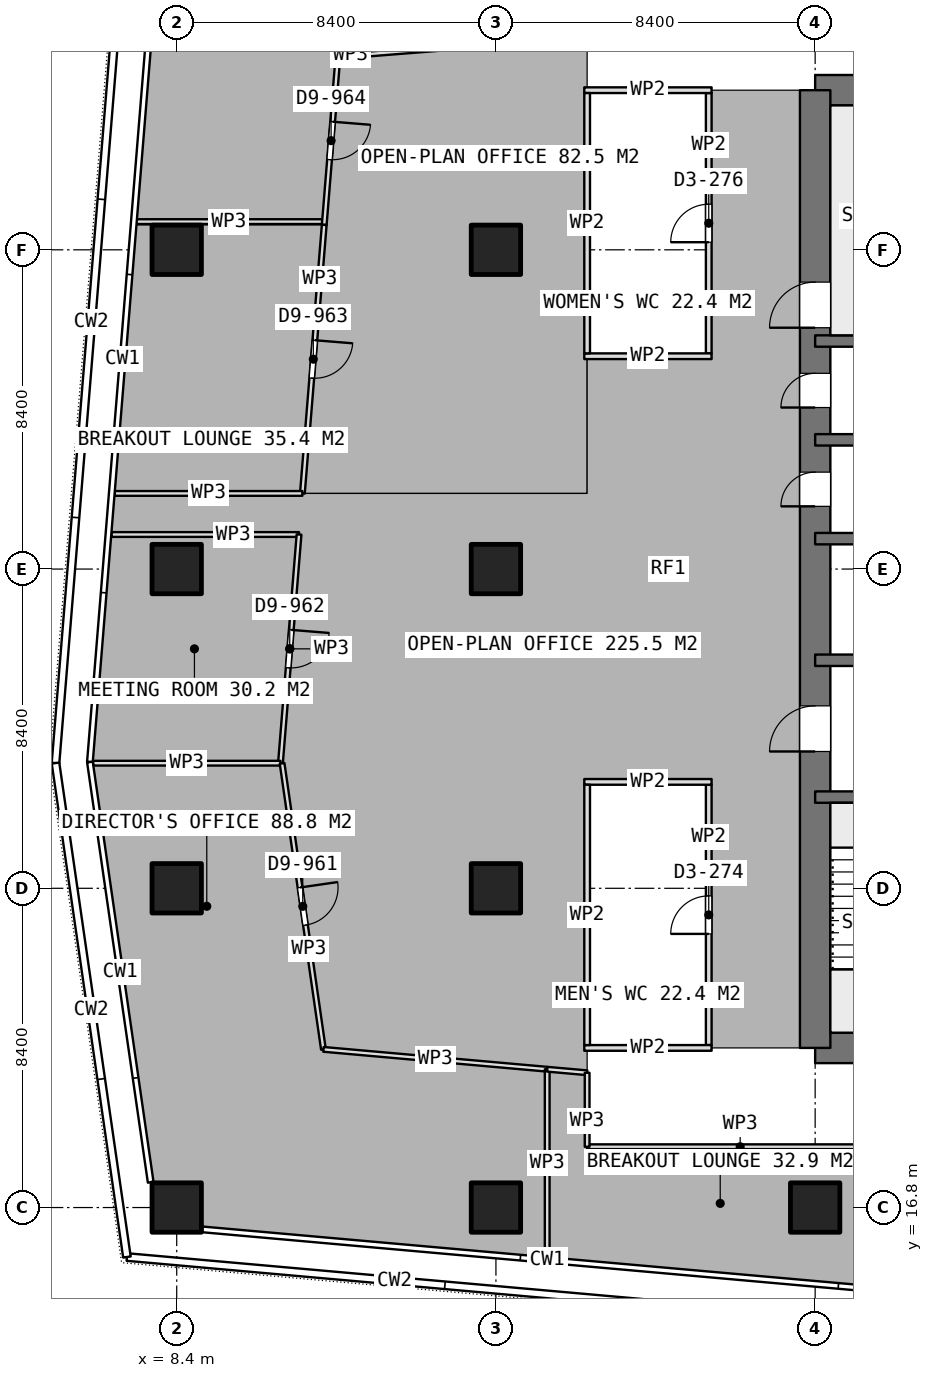
"""IFC4 building model, lengths in metres.
Left out: names, types, materials, properties, quantities, classifications, styles, units other than length and angle.
Written with IfcOpenShell. Run it as: python <this file> out.ifc"""

import sys

from ifc_helpers import new_model, si_unit, direction, frame, frame_2d, origin, origin_2d, place, context, subcontext, project, spatial, rectangle, extrude, element, fill, save


model = new_model("IFC4")
c1 = context("Model", 3, precision=1e-05, world=origin(), true_north=direction((0.0, 1.0)))
c2 = subcontext(c1, "Body", "Model", "MODEL_VIEW")
j1 = project(units=[si_unit("LENGTHUNIT", "METRE"), si_unit("PLANEANGLEUNIT", "RADIAN")], contexts=[c1])
p1 = place(None, origin())
s1 = spatial("IfcSite", under=j1, at=p1, CompositionType="ELEMENT")
p2 = place(p1, origin())
s2 = spatial("IfcBuilding", under=s1, at=p2, CompositionType="ELEMENT")
p3 = place(p2, frame((0.0, 0.0, 257.6)))
s3 = spatial("IfcBuildingStorey", under=s2, at=p3, CompositionType="ELEMENT", Elevation=257.6)
for number, where, z_axis, x_axis in (
    (1, (25.2, 21.0, 0.0), (0.0, 0.0, 1.0), (1.0, 0.0, 0.0)),
    (2, (25.2, 46.2, 0.0), (0.0, 0.0, 1.0), (1.0, 0.0, 0.0)),
):
    element("IfcWall", number, at=place(p3, frame(where, z_axis=z_axis, x_axis=x_axis)), inside=s3, PredefinedType="SHEAR", context=c2, shape_type="SweptSolid", body=[
        extrude(rectangle(XDim=10.4, YDim=0.8, at=frame_2d((5.2, 0.0))), origin(), (0.0, 0.0, 1.0), 3.75),
    ])
p4 = place(p3, frame((25.2, 21.0, 0.0), z_axis=(0.0, 0.0, 1.0), x_axis=(0.0, 1.0, 0.0)))
e3 = element("IfcWall", 3, at=p4, inside=s3, PredefinedType="SHEAR", context=c2, shape_type="SweptSolid", body=[
    extrude(rectangle(XDim=25.2, YDim=0.8, at=frame_2d((12.6, 0.0))), origin(), (0.0, 0.0, 1.0), 3.75),
])
p5 = place(p4, frame((7.8, 0.0, 0.0)))
e4 = element("IfcOpeningElement", 4, at=p5, cuts=e3, PredefinedType="OPENING", context=c2, shape_type="SweptSolid", body=[
    extrude(rectangle(XDim=1.2, YDim=2.1, at=frame_2d((0.6, 1.05))), frame((0.0, 0.41, 0.0), z_axis=(0.0, -1.0, 0.0), x_axis=(1.0, 0.0, 0.0)), (0.0, 0.0, 1.0), 0.82),
])
p6 = place(p4, frame((14.25, 0.0, 0.0)))
e5 = element("IfcOpeningElement", 5, at=p6, cuts=e3, PredefinedType="OPENING", context=c2, shape_type="SweptSolid", body=[
    extrude(rectangle(XDim=0.9, YDim=2.1, at=frame_2d((0.45, 1.05))), frame((0.0, 0.41, 0.0), z_axis=(0.0, -1.0, 0.0), x_axis=(1.0, 0.0, 0.0)), (0.0, 0.0, 1.0), 0.82),
])
p7 = place(p4, frame((16.85, 0.0, 0.0)))
e6 = element("IfcOpeningElement", 6, at=p7, cuts=e3, PredefinedType="OPENING", context=c2, shape_type="SweptSolid", body=[
    extrude(rectangle(XDim=0.9, YDim=2.1, at=frame_2d((0.45, 1.05))), frame((0.0, 0.41, 0.0), z_axis=(0.0, -1.0, 0.0), x_axis=(1.0, 0.0, 0.0)), (0.0, 0.0, 1.0), 0.82),
])
p8 = place(p4, frame((18.95, 0.0, 0.0)))
e7 = element("IfcOpeningElement", 7, at=p8, cuts=e3, PredefinedType="OPENING", context=c2, shape_type="SweptSolid", body=[
    extrude(rectangle(XDim=1.2, YDim=2.1, at=frame_2d((0.6, 1.05))), frame((0.0, 0.41, 0.0), z_axis=(0.0, -1.0, 0.0), x_axis=(1.0, 0.0, 0.0)), (0.0, 0.0, 1.0), 0.82),
])
p9 = place(p3, frame((25.2, 27.6, 0.0), z_axis=(0.0, 0.0, 1.0), x_axis=(1.0, 0.0, 0.0)))
e8 = element("IfcWall", 8, at=p9, inside=s3, PredefinedType="SHEAR", context=c2, shape_type="SweptSolid", body=[
    extrude(rectangle(XDim=6.6, YDim=0.3, at=frame_2d((3.3, 0.0))), origin(), (0.0, 0.0, 1.0), 3.75),
])
p10 = place(p9, frame((5.05, 0.0, 0.0)))
e9 = element("IfcOpeningElement", 9, at=p10, cuts=e8, PredefinedType="OPENING", context=c2, shape_type="SweptSolid", body=[
    extrude(rectangle(XDim=1.2, YDim=2.1, at=frame_2d((0.6, 1.05))), frame((0.0, 0.16, 0.0), z_axis=(0.0, -1.0, 0.0), x_axis=(1.0, 0.0, 0.0)), (0.0, 0.0, 1.0), 0.32),
])
p11 = place(p3, frame((25.2, 31.2, 0.0), z_axis=(0.0, 0.0, 1.0), x_axis=(1.0, 0.0, 0.0)))
e10 = element("IfcWall", 10, at=p11, inside=s3, PredefinedType="SHEAR", context=c2, shape_type="SweptSolid", body=[
    extrude(rectangle(XDim=6.6, YDim=0.3, at=frame_2d((3.3, 0.0))), origin(), (0.0, 0.0, 1.0), 3.75),
])
p12 = place(p11, frame((2.65, 0.0, 0.0)))
e11 = element("IfcOpeningElement", 11, at=p12, cuts=e10, PredefinedType="OPENING", context=c2, shape_type="SweptSolid", body=[
    extrude(rectangle(XDim=1.3, YDim=2.1, at=frame_2d((0.65, 1.05))), frame((0.0, 0.16, 0.0), z_axis=(0.0, -1.0, 0.0), x_axis=(1.0, 0.0, 0.0)), (0.0, 0.0, 1.0), 0.32),
])
for number, where, z_axis, x_axis in (
    (12, (25.2, 34.4, 0.0), (0.0, 0.0, 1.0), (1.0, 0.0, 0.0)),
    (13, (25.2, 37.0, 0.0), (0.0, 0.0, 1.0), (1.0, 0.0, 0.0)),
    (14, (25.2, 39.6, 0.0), (0.0, 0.0, 1.0), (1.0, 0.0, 0.0)),
):
    element("IfcWall", number, at=place(p3, frame(where, z_axis=z_axis, x_axis=x_axis)), inside=s3, PredefinedType="SHEAR", context=c2, shape_type="SweptSolid", body=[
        extrude(rectangle(XDim=6.6, YDim=0.3, at=frame_2d((3.3, 0.0))), origin(), (0.0, 0.0, 1.0), 3.75),
    ])
for number, where, z_axis, x_axis in (
    (15, (8.4, 16.8, 0.0), (0.0, 0.0, 1.0), (1.0, 0.0, 0.0)),
    (16, (8.4, 25.2, 0.0), (0.0, 0.0, 1.0), (1.0, 0.0, 0.0)),
    (17, (8.4, 33.6, 0.0), (0.0, 0.0, 1.0), (1.0, 0.0, 0.0)),
    (18, (8.4, 42.0, 0.0), (0.0, 0.0, 1.0), (1.0, 0.0, 0.0)),
    (19, (16.8, 16.8, 0.0), (0.0, 0.0, 1.0), (1.0, 0.0, 0.0)),
    (20, (16.8, 25.2, 0.0), (0.0, 0.0, 1.0), (1.0, 0.0, 0.0)),
    (21, (16.8, 33.6, 0.0), (0.0, 0.0, 1.0), (1.0, 0.0, 0.0)),
    (22, (16.8, 42.0, 0.0), (0.0, 0.0, 1.0), (1.0, 0.0, 0.0)),
    (23, (25.2, 16.8, 0.0), (0.0, 0.0, 1.0), (1.0, 0.0, 0.0)),
):
    element("IfcColumn", number, at=place(p3, frame(where, z_axis=z_axis, x_axis=x_axis)), inside=s3, PredefinedType="COLUMN", context=c2, shape_type="SweptSolid", body=[
        extrude(rectangle(XDim=1.3, YDim=1.3, at=origin_2d()), origin(), (0.0, 0.0, 1.0), 3.75),
    ])
for number, where, z_axis, x_axis in (
    (24, (19.125, 39.2, 0.0), (0.0, 0.0, 1.0), (1.0, 0.0, 0.0)),
    (25, (19.125, 46.2, 0.0), (0.0, 0.0, 1.0), (1.0, 0.0, 0.0)),
):
    element("IfcWall", number, at=place(p3, frame(where, z_axis=z_axis, x_axis=x_axis)), inside=s3, PredefinedType="PARTITIONING", context=c2, shape_type="SweptSolid", body=[
        extrude(rectangle(XDim=3.35, YDim=0.15, at=frame_2d((1.675, 0.0))), origin(), (0.0, 0.0, 1.0), 3.5),
    ])
p13 = place(p3, frame((19.2, 39.275, 0.0), z_axis=(0.0, 0.0, 1.0), x_axis=(0.0, 1.0, 0.0)))
e26 = element("IfcWall", 26, at=p13, inside=s3, PredefinedType="PARTITIONING", context=c2, shape_type="SweptSolid", body=[
    extrude(rectangle(XDim=6.85, YDim=0.15, at=frame_2d((3.425, 0.0))), origin(), (0.0, 0.0, 1.0), 3.5),
])
p14 = place(p3, frame((22.4, 39.275, 0.0), z_axis=(0.0, 0.0, 1.0), x_axis=(0.0, 1.0, 0.0)))
e27 = element("IfcWall", 27, at=p14, inside=s3, PredefinedType="PARTITIONING", context=c2, shape_type="SweptSolid", body=[
    extrude(rectangle(XDim=6.85, YDim=0.15, at=frame_2d((3.425, 0.0))), origin(), (0.0, 0.0, 1.0), 3.5),
])
p15 = place(p14, frame((2.925, 0.0, 0.0)))
e28 = element("IfcOpeningElement", 28, at=p15, cuts=e27, PredefinedType="OPENING", context=c2, shape_type="SweptSolid", body=[
    extrude(rectangle(XDim=1.0, YDim=2.1, at=frame_2d((0.5, 1.05))), frame((0.0, 0.085, 0.0), z_axis=(0.0, -1.0, 0.0), x_axis=(1.0, 0.0, 0.0)), (0.0, 0.0, 1.0), 0.17),
])
for number, where, z_axis, x_axis in (
    (29, (19.125, 21.0, 0.0), (0.0, 0.0, 1.0), (1.0, 0.0, 0.0)),
    (30, (19.125, 28.0, 0.0), (0.0, 0.0, 1.0), (1.0, 0.0, 0.0)),
):
    element("IfcWall", number, at=place(p3, frame(where, z_axis=z_axis, x_axis=x_axis)), inside=s3, PredefinedType="PARTITIONING", context=c2, shape_type="SweptSolid", body=[
        extrude(rectangle(XDim=3.35, YDim=0.15, at=frame_2d((1.675, 0.0))), origin(), (0.0, 0.0, 1.0), 3.5),
    ])
p16 = place(p3, frame((19.2, 21.075, 0.0), z_axis=(0.0, 0.0, 1.0), x_axis=(0.0, 1.0, 0.0)))
e31 = element("IfcWall", 31, at=p16, inside=s3, PredefinedType="PARTITIONING", context=c2, shape_type="SweptSolid", body=[
    extrude(rectangle(XDim=6.85, YDim=0.15, at=frame_2d((3.425, 0.0))), origin(), (0.0, 0.0, 1.0), 3.5),
])
p17 = place(p3, frame((22.4, 21.075, 0.0), z_axis=(0.0, 0.0, 1.0), x_axis=(0.0, 1.0, 0.0)))
e32 = element("IfcWall", 32, at=p17, inside=s3, PredefinedType="PARTITIONING", context=c2, shape_type="SweptSolid", body=[
    extrude(rectangle(XDim=6.85, YDim=0.15, at=frame_2d((3.425, 0.0))), origin(), (0.0, 0.0, 1.0), 3.5),
])
p18 = place(p17, frame((2.925, 0.0, 0.0)))
e33 = element("IfcOpeningElement", 33, at=p18, cuts=e32, PredefinedType="OPENING", context=c2, shape_type="SweptSolid", body=[
    extrude(rectangle(XDim=1.0, YDim=2.1, at=frame_2d((0.5, 1.05))), frame((0.0, 0.085, 0.0), z_axis=(0.0, -1.0, 0.0), x_axis=(1.0, 0.0, 0.0)), (0.0, 0.0, 1.0), 0.17),
])
p19 = place(p3, frame((12.226, 42.742, 0.0), z_axis=(0.0, 0.0, 1.0), x_axis=(-1.0, 0.0, 0.0)))
e34 = element("IfcWall", 34, at=p19, inside=s3, PredefinedType="PARTITIONING", context=c2, shape_type="SweptSolid", body=[
    extrude(rectangle(XDim=4.903, YDim=0.125, at=frame_2d((2.452, 0.0))), origin(), (0.0, 0.0, 1.0), 3.5),
])
p20 = place(p3, frame((15.95, 47.351, 0.0), z_axis=(0.0, 0.0, 1.0), x_axis=(-0.99682463174, -0.07962822086, 0.0)))
e35 = element("IfcWall", 35, at=p20, inside=s3, PredefinedType="PARTITIONING", context=c2, shape_type="SweptSolid", body=[
    extrude(rectangle(XDim=3.317, YDim=0.125, at=frame_2d((1.659, 0.0))), origin(), (0.0, 0.0, 1.0), 3.5),
])
p21 = place(p3, frame((12.643, 47.087, 0.0), z_axis=(0.0, 0.0, 1.0), x_axis=(-0.081240627764, -0.996694517092, 0.0)))
e36 = element("IfcWall", 36, at=p21, inside=s3, PredefinedType="PARTITIONING", context=c2, shape_type="SweptSolid", body=[
    extrude(rectangle(XDim=4.445, YDim=0.125, at=frame_2d((2.222, 0.0))), origin(), (0.0, 0.0, 1.0), 3.5),
])
p22 = place(p21, frame((1.722, 0.0, 0.0)))
e37 = element("IfcOpeningElement", 37, at=p22, cuts=e36, PredefinedType="OPENING", context=c2, shape_type="SweptSolid", body=[
    extrude(rectangle(XDim=1.0, YDim=2.1, at=frame_2d((0.5, 1.05))), frame((0.0, 0.073, 0.0), z_axis=(0.0, -1.0, 0.0), x_axis=(1.0, 0.0, 0.0)), (0.0, 0.0, 1.0), 0.145),
])
p23 = place(p3, frame((12.282, 42.656, 0.0), z_axis=(0.0, 0.0, 1.0), x_axis=(-0.08110159124, -0.996705840205, 0.0)))
e38 = element("IfcWall", 38, at=p23, inside=s3, PredefinedType="PARTITIONING", context=c2, shape_type="SweptSolid", body=[
    extrude(rectangle(XDim=7.089, YDim=0.125, at=frame_2d((3.545, 0.0))), origin(), (0.0, 0.0, 1.0), 3.5),
])
p24 = place(p23, frame((3.045, 0.0, 0.0)))
e39 = element("IfcOpeningElement", 39, at=p24, cuts=e38, PredefinedType="OPENING", context=c2, shape_type="SweptSolid", body=[
    extrude(rectangle(XDim=1.0, YDim=2.1, at=frame_2d((0.5, 1.05))), frame((0.0, 0.073, 0.0), z_axis=(0.0, -1.0, 0.0), x_axis=(1.0, 0.0, 0.0)), (0.0, 0.0, 1.0), 0.145),
])
p25 = place(p3, frame((11.707, 35.59, 0.0), z_axis=(0.0, 0.0, 1.0), x_axis=(-1.0, 0.0, 0.0)))
e40 = element("IfcWall", 40, at=p25, inside=s3, PredefinedType="PARTITIONING", context=c2, shape_type="SweptSolid", body=[
    extrude(rectangle(XDim=4.936, YDim=0.125, at=frame_2d((2.468, 0.0))), origin(), (0.0, 0.0, 1.0), 3.5),
])
p26 = place(p3, frame((6.683, 34.509, 0.0), z_axis=(0.0, 0.0, 1.0), x_axis=(1.0, 0.0, 0.0)))
e41 = element("IfcWall", 41, at=p26, inside=s3, PredefinedType="PARTITIONING", context=c2, shape_type="SweptSolid", body=[
    extrude(rectangle(XDim=4.936, YDim=0.125, at=frame_2d((2.468, 0.0))), origin(), (0.0, 0.0, 1.0), 3.5),
])
p27 = place(p3, frame((11.619, 34.509, 0.0), z_axis=(0.0, 0.0, 1.0), x_axis=(-0.081003722278, -0.99671379893, 0.0)))
e42 = element("IfcWall", 42, at=p27, inside=s3, PredefinedType="PARTITIONING", context=c2, shape_type="SweptSolid", body=[
    extrude(rectangle(XDim=6.037, YDim=0.125, at=frame_2d((3.019, 0.0))), origin(), (0.0, 0.0, 1.0), 3.5),
])
p28 = place(p27, frame((2.518, 0.0, 0.0)))
e43 = element("IfcOpeningElement", 43, at=p28, cuts=e42, PredefinedType="OPENING", context=c2, shape_type="SweptSolid", body=[
    extrude(rectangle(XDim=1.0, YDim=2.1, at=frame_2d((0.5, 1.05))), frame((0.0, 0.073, 0.0), z_axis=(0.0, -1.0, 0.0), x_axis=(1.0, 0.0, 0.0)), (0.0, 0.0, 1.0), 0.145),
])
p29 = place(p3, frame((11.13, 28.492, 0.0), z_axis=(0.0, 0.0, 1.0), x_axis=(-1.0, 0.0, 0.0)))
e44 = element("IfcWall", 44, at=p29, inside=s3, PredefinedType="PARTITIONING", context=c2, shape_type="SweptSolid", body=[
    extrude(rectangle(XDim=4.929, YDim=0.125, at=frame_2d((2.464, 0.0))), origin(), (0.0, 0.0, 1.0), 3.5),
])
p30 = place(p3, frame((11.173, 28.488, 0.0), z_axis=(0.0, 0.0, 1.0), x_axis=(0.143061748966, -0.989713764673, 0.0)))
e45 = element("IfcWall", 45, at=p30, inside=s3, PredefinedType="PARTITIONING", context=c2, shape_type="SweptSolid", body=[
    extrude(rectangle(XDim=7.604, YDim=0.125, at=frame_2d((3.802, 0.0))), origin(), (0.0, 0.0, 1.0), 3.5),
])
p31 = place(p30, frame((3.301, 0.0, 0.0)))
e46 = element("IfcOpeningElement", 46, at=p31, cuts=e45, PredefinedType="OPENING", context=c2, shape_type="SweptSolid", body=[
    extrude(rectangle(XDim=1.0, YDim=2.1, at=frame_2d((0.5, 1.05))), frame((0.0, 0.073, 0.0), z_axis=(0.0, -1.0, 0.0), x_axis=(1.0, 0.0, 0.0)), (0.0, 0.0, 1.0), 0.145),
])
p32 = place(p3, frame((12.261, 20.962, 0.0), z_axis=(0.0, 0.0, 1.0), x_axis=(0.996078951833, -0.08846876124, 0.0)))
e47 = element("IfcWall", 47, at=p32, inside=s3, PredefinedType="PARTITIONING", context=c2, shape_type="SweptSolid", body=[
    extrude(rectangle(XDim=5.911, YDim=0.125, at=frame_2d((2.956, 0.0))), origin(), (0.0, 0.0, 1.0), 3.5),
])
p33 = place(p3, frame((18.149, 20.439, 0.0), z_axis=(0.0, 0.0, 1.0), x_axis=(0.0, -1.0, 0.0)))
e48 = element("IfcWall", 48, at=p33, inside=s3, PredefinedType="PARTITIONING", context=c2, shape_type="SweptSolid", body=[
    extrude(rectangle(XDim=4.939, YDim=0.125, at=frame_2d((2.469, 0.0))), origin(), (0.0, 0.0, 1.0), 3.5),
])
p34 = place(p3, frame((19.2, 18.4, 0.0), z_axis=(0.0, 0.0, 1.0), x_axis=(1.0, 0.0, 0.0)))
e49 = element("IfcWall", 49, at=p34, inside=s3, PredefinedType="PARTITIONING", context=c2, shape_type="SweptSolid", body=[
    extrude(rectangle(XDim=8.054, YDim=0.125, at=frame_2d((4.027, 0.0))), origin(), (0.0, 0.0, 1.0), 3.5),
])
p35 = place(p3, frame((18.15, 20.439, 0.0), z_axis=(0.0, 0.0, 1.0), x_axis=(0.996099374617, -0.088238517026, 0.0)))
e50 = element("IfcWall", 50, at=p35, inside=s3, PredefinedType="PARTITIONING", context=c2, shape_type="SweptSolid", body=[
    extrude(rectangle(XDim=1.054, YDim=0.125, at=frame_2d((0.527, 0.0))), origin(), (0.0, 0.0, 1.0), 3.5),
])
p36 = place(p3, frame((19.2, 20.346, 0.0), z_axis=(0.0, 0.0, 1.0), x_axis=(0.0, -1.0, 0.0)))
e51 = element("IfcWall", 51, at=p36, inside=s3, PredefinedType="PARTITIONING", context=c2, shape_type="SweptSolid", body=[
    extrude(rectangle(XDim=1.946, YDim=0.125, at=frame_2d((0.973, 0.0))), origin(), (0.0, 0.0, 1.0), 3.5),
])
p37 = place(p5, origin())
e52 = element("IfcDoor", 52, at=p37, inside=s3, OperationType="SINGLE_SWING_LEFT", PredefinedType="DOOR", context=c2, shape_type="SweptSolid", body=[
    extrude(rectangle(XDim=1.2, YDim=2.1, at=frame_2d((0.6, 1.05))), frame((0.0, 0.025, 0.0), z_axis=(0.0, -1.0, 0.0), x_axis=(1.0, 0.0, 0.0)), (0.0, 0.0, 1.0), 0.05),
])
fill(e4, e52)
p38 = place(p6, origin())
e53 = element("IfcDoor", 53, at=p38, inside=s3, OperationType="SINGLE_SWING_LEFT", PredefinedType="DOOR", context=c2, shape_type="SweptSolid", body=[
    extrude(rectangle(XDim=0.9, YDim=2.1, at=frame_2d((0.45, 1.05))), frame((0.0, 0.025, 0.0), z_axis=(0.0, -1.0, 0.0), x_axis=(1.0, 0.0, 0.0)), (0.0, 0.0, 1.0), 0.05),
])
fill(e5, e53)
p39 = place(p7, origin())
e54 = element("IfcDoor", 54, at=p39, inside=s3, OperationType="SINGLE_SWING_LEFT", PredefinedType="DOOR", context=c2, shape_type="SweptSolid", body=[
    extrude(rectangle(XDim=0.9, YDim=2.1, at=frame_2d((0.45, 1.05))), frame((0.0, 0.025, 0.0), z_axis=(0.0, -1.0, 0.0), x_axis=(1.0, 0.0, 0.0)), (0.0, 0.0, 1.0), 0.05),
])
fill(e6, e54)
p40 = place(p15, origin())
e55 = element("IfcDoor", 55, at=p40, inside=s3, OperationType="SINGLE_SWING_LEFT", PredefinedType="DOOR", context=c2, shape_type="SweptSolid", body=[
    extrude(rectangle(XDim=1.0, YDim=2.1, at=frame_2d((0.5, 1.05))), frame((0.0, 0.025, 0.0), z_axis=(0.0, -1.0, 0.0), x_axis=(1.0, 0.0, 0.0)), (0.0, 0.0, 1.0), 0.05),
])
fill(e28, e55)
p41 = place(p18, origin())
e56 = element("IfcDoor", 56, at=p41, inside=s3, OperationType="SINGLE_SWING_LEFT", PredefinedType="DOOR", context=c2, shape_type="SweptSolid", body=[
    extrude(rectangle(XDim=1.0, YDim=2.1, at=frame_2d((0.5, 1.05))), frame((0.0, 0.025, 0.0), z_axis=(0.0, -1.0, 0.0), x_axis=(1.0, 0.0, 0.0)), (0.0, 0.0, 1.0), 0.05),
])
fill(e33, e56)
p42 = place(p22, origin())
e57 = element("IfcDoor", 57, at=p42, inside=s3, OperationType="SINGLE_SWING_LEFT", PredefinedType="DOOR", context=c2, shape_type="SweptSolid", body=[
    extrude(rectangle(XDim=1.0, YDim=2.1, at=frame_2d((0.5, 1.05))), frame((0.0, 0.025, 0.0), z_axis=(0.0, -1.0, 0.0), x_axis=(1.0, 0.0, 0.0)), (0.0, 0.0, 1.0), 0.05),
])
fill(e37, e57)
p43 = place(p24, origin())
e58 = element("IfcDoor", 58, at=p43, inside=s3, OperationType="SINGLE_SWING_LEFT", PredefinedType="DOOR", context=c2, shape_type="SweptSolid", body=[
    extrude(rectangle(XDim=1.0, YDim=2.1, at=frame_2d((0.5, 1.05))), frame((0.0, 0.025, 0.0), z_axis=(0.0, -1.0, 0.0), x_axis=(1.0, 0.0, 0.0)), (0.0, 0.0, 1.0), 0.05),
])
fill(e39, e58)
p44 = place(p28, origin())
e59 = element("IfcDoor", 59, at=p44, inside=s3, OperationType="SINGLE_SWING_LEFT", PredefinedType="DOOR", context=c2, shape_type="SweptSolid", body=[
    extrude(rectangle(XDim=1.0, YDim=2.1, at=frame_2d((0.5, 1.05))), frame((0.0, 0.025, 0.0), z_axis=(0.0, -1.0, 0.0), x_axis=(1.0, 0.0, 0.0)), (0.0, 0.0, 1.0), 0.05),
])
fill(e43, e59)
p45 = place(p31, origin())
e60 = element("IfcDoor", 60, at=p45, inside=s3, OperationType="SINGLE_SWING_LEFT", PredefinedType="DOOR", context=c2, shape_type="SweptSolid", body=[
    extrude(rectangle(XDim=1.0, YDim=2.1, at=frame_2d((0.5, 1.05))), frame((0.0, 0.025, 0.0), z_axis=(0.0, -1.0, 0.0), x_axis=(1.0, 0.0, 0.0)), (0.0, 0.0, 1.0), 0.05),
])
fill(e46, e60)
p46 = place(p8, origin())
e61 = element("IfcDoor", 61, at=p46, inside=s3, OperationType="SINGLE_SWING_RIGHT", PredefinedType="DOOR", context=c2, shape_type="SweptSolid", body=[
    extrude(rectangle(XDim=1.2, YDim=2.1, at=frame_2d((0.6, 1.05))), frame((0.0, 0.025, 0.0), z_axis=(0.0, -1.0, 0.0), x_axis=(1.0, 0.0, 0.0)), (0.0, 0.0, 1.0), 0.05),
])
fill(e7, e61)
save(model, sys.argv[1])
